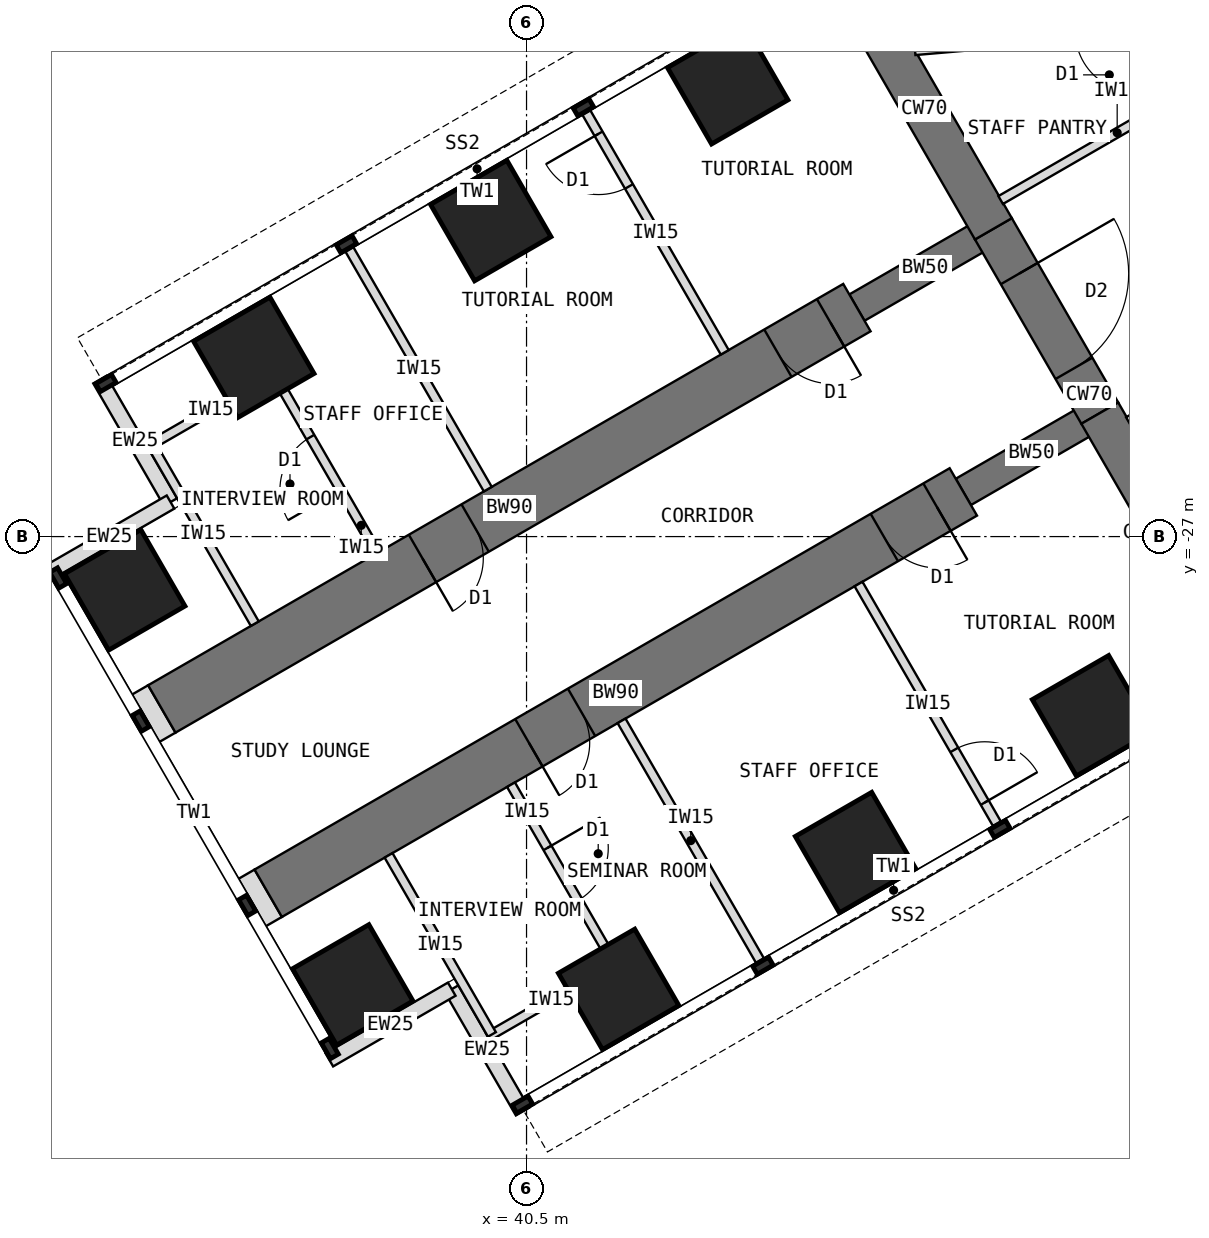
"""IFC4 building model, lengths in metres.
Left out: names, types, materials, properties, quantities, classifications, styles, units other than length and angle.
Written with IfcOpenShell. Run it as: python <this file> out.ifc"""

import sys

from ifc_helpers import new_model, si_unit, direction, frame, frame_2d, origin, origin_2d, place, context, subcontext, project, spatial, rectangle, extrude, element, fill, save


model = new_model("IFC4")
c1 = context("Model", 3, precision=1e-05, world=origin(), true_north=direction((0.0, 1.0)))
c2 = subcontext(c1, "Body", "Model", "MODEL_VIEW")
j1 = project(units=[si_unit("LENGTHUNIT", "METRE"), si_unit("PLANEANGLEUNIT", "RADIAN")], contexts=[c1])
p1 = place(None, origin())
s1 = spatial("IfcSite", under=j1, at=p1, CompositionType="ELEMENT")
p2 = place(p1, origin())
s2 = spatial("IfcBuilding", under=s1, at=p2, CompositionType="ELEMENT")
p3 = place(p2, frame((0.0, 0.0, 60.5)))
s3 = spatial("IfcBuildingStorey", under=s2, at=p3, CompositionType="ELEMENT", Elevation=60.5)
p4 = place(p3, frame((45.904, -18.0, 0.0), z_axis=(0.0, 0.0, 1.0), x_axis=(0.500024481964, -0.866011268655, 0.0)))
e1 = element("IfcWall", 1, at=p4, inside=s3, PredefinedType="SHEAR", context=c2, shape_type="SweptSolid", body=[
    extrude(rectangle(XDim=4.548, YDim=0.7, at=frame_2d((2.274, 0.0))), origin(), (0.0, 0.0, 1.0), 4.0),
])
p5 = place(p3, frame((48.178, -21.939, 0.0), z_axis=(0.0, 0.0, 1.0), x_axis=(0.500010275428, -0.866019471182, 0.0)))
e2 = element("IfcWall", 2, at=p5, inside=s3, PredefinedType="SHEAR", context=c2, shape_type="SweptSolid", body=[
    extrude(rectangle(XDim=3.5, YDim=0.7, at=frame_2d((1.75, 0.0))), origin(), (0.0, 0.0, 1.0), 4.0),
])
p6 = place(p5, frame((0.85, 0.0, 0.0)))
e3 = element("IfcOpeningElement", 3, at=p6, cuts=e2, PredefinedType="OPENING", context=c2, shape_type="SweptSolid", body=[
    extrude(rectangle(XDim=1.8, YDim=2.1, at=frame_2d((0.9, 1.05))), frame((0.0, 0.36, 0.0), z_axis=(0.0, -1.0, 0.0), x_axis=(1.0, 0.0, 0.0)), (0.0, 0.0, 1.0), 0.72),
])
p7 = place(p3, frame((49.928, -24.97, 0.0), z_axis=(0.0, 0.0, 1.0), x_axis=(0.499984222037, -0.866034513004, 0.0)))
e4 = element("IfcWall", 4, at=p7, inside=s3, PredefinedType="SHEAR", context=c2, shape_type="SweptSolid", body=[
    extrude(rectangle(XDim=4.548, YDim=0.7, at=frame_2d((2.274, 0.0))), origin(), (0.0, 0.0, 1.0), 4.0),
])
p8 = place(p3, frame((49.928, -24.97, 0.0), z_axis=(0.0, 0.0, 1.0), x_axis=(-0.866031863473, -0.499988811324, 0.0)))
e5 = element("IfcWall", 5, at=p8, inside=s3, PredefinedType="SHEAR", context=c2, shape_type="SweptSolid", body=[
    extrude(rectangle(XDim=2.592, YDim=0.5, at=frame_2d((1.296, 0.0))), origin(), (0.0, 0.0, 1.0), 4.0),
])
p9 = place(p3, frame((47.684, -26.266, 0.0), z_axis=(0.0, 0.0, 1.0), x_axis=(-0.866027579429, -0.499996231654, 0.0)))
e6 = element("IfcWall", 6, at=p9, inside=s3, PredefinedType="SHEAR", context=c2, shape_type="SweptSolid", body=[
    extrude(rectangle(XDim=13.2, YDim=0.9, at=frame_2d((6.6, 0.0))), origin(), (0.0, 0.0, 1.0), 4.0),
])
p10 = place(p9, frame((0.5, 0.0, 0.0)))
e7 = element("IfcOpeningElement", 7, at=p10, cuts=e6, PredefinedType="OPENING", context=c2, shape_type="SweptSolid", body=[
    extrude(rectangle(XDim=1.0, YDim=2.1, at=frame_2d((0.5, 1.05))), frame((0.0, 0.46, 0.0), z_axis=(0.0, -1.0, 0.0), x_axis=(1.0, 0.0, 0.0)), (0.0, 0.0, 1.0), 0.92),
])
p11 = place(p9, frame((7.25, 0.0, 0.0)))
e8 = element("IfcOpeningElement", 8, at=p11, cuts=e6, PredefinedType="OPENING", context=c2, shape_type="SweptSolid", body=[
    extrude(rectangle(XDim=1.0, YDim=2.1, at=frame_2d((0.5, 1.05))), frame((0.0, 0.46, 0.0), z_axis=(0.0, -1.0, 0.0), x_axis=(1.0, 0.0, 0.0)), (0.0, 0.0, 1.0), 0.92),
])
p12 = place(p3, frame((48.178, -21.939, 0.0), z_axis=(0.0, 0.0, 1.0), x_axis=(-0.866072649678, -0.499918158782, 0.0)))
e9 = element("IfcWall", 9, at=p12, inside=s3, PredefinedType="SHEAR", context=c2, shape_type="SweptSolid", body=[
    extrude(rectangle(XDim=2.592, YDim=0.5, at=frame_2d((1.296, 0.0))), origin(), (0.0, 0.0, 1.0), 4.0),
])
p13 = place(p3, frame((45.934, -23.234, 0.0), z_axis=(0.0, 0.0, 1.0), x_axis=(-0.866019570528, -0.500010103361, 0.0)))
e10 = element("IfcWall", 10, at=p13, inside=s3, PredefinedType="SHEAR", context=c2, shape_type="SweptSolid", body=[
    extrude(rectangle(XDim=13.2, YDim=0.9, at=frame_2d((6.6, 0.0))), origin(), (0.0, 0.0, 1.0), 4.0),
])
p14 = place(p13, frame((0.5, 0.0, 0.0)))
e11 = element("IfcOpeningElement", 11, at=p14, cuts=e10, PredefinedType="OPENING", context=c2, shape_type="SweptSolid", body=[
    extrude(rectangle(XDim=1.0, YDim=2.1, at=frame_2d((0.5, 1.05))), frame((0.0, 0.46, 0.0), z_axis=(0.0, -1.0, 0.0), x_axis=(1.0, 0.0, 0.0)), (0.0, 0.0, 1.0), 0.92),
])
p15 = place(p13, frame((7.25, 0.0, 0.0)))
e12 = element("IfcOpeningElement", 12, at=p15, cuts=e10, PredefinedType="OPENING", context=c2, shape_type="SweptSolid", body=[
    extrude(rectangle(XDim=1.0, YDim=2.1, at=frame_2d((0.5, 1.05))), frame((0.0, 0.46, 0.0), z_axis=(0.0, -1.0, 0.0), x_axis=(1.0, 0.0, 0.0)), (0.0, 0.0, 1.0), 0.92),
])
for number, where, z_axis, x_axis in (
    (13, (49.809, -29.946, 0.0), (0.0, 0.0, 1.0), (0.866, 0.5, 0.0)),
    (14, (43.809, -19.554, 0.0), (0.0, 0.0, 1.0), (0.866, 0.5, 0.0)),
    (15, (45.912, -32.196, 0.0), (0.0, 0.0, 1.0), (0.866, 0.5, 0.0)),
    (16, (39.912, -21.804, 0.0), (0.0, 0.0, 1.0), (0.866, 0.5, 0.0)),
    (17, (42.014, -34.446, 0.0), (0.0, 0.0, 1.0), (0.866, 0.5, 0.0)),
    (18, (36.014, -24.054, 0.0), (0.0, 0.0, 1.0), (0.866, 0.5, 0.0)),
    (19, (37.642, -34.373, 0.0), (0.0, 0.0, 1.0), (0.866, 0.5, 0.0)),
    (20, (33.892, -27.877, 0.0), (0.0, 0.0, 1.0), (0.866, 0.5, 0.0)),
):
    element("IfcColumn", number, at=place(p3, frame(where, z_axis=z_axis, x_axis=x_axis)), inside=s3, PredefinedType="COLUMN", context=c2, shape_type="SweptSolid", body=[
        extrude(rectangle(XDim=1.45, YDim=1.45, at=origin_2d()), origin(), (0.0, 0.0, 1.0), 4.0),
    ])
for number, where, z_axis, x_axis in (
    (21, (40.433, -36.456, 0.0), (0.0, 0.0, 1.0), (-0.5, 0.866, 0.0)),
    (22, (39.27, -34.443, 0.0), (0.0, 0.0, 1.0), (-0.866, -0.5, 0.0)),
    (23, (33.483, -24.419, 0.0), (0.0, 0.0, 1.0), (0.5, -0.866, 0.0)),
    (24, (34.645, -26.432, 0.0), (0.0, 0.0, 1.0), (-0.866, -0.5, 0.0)),
):
    element("IfcWall", number, at=place(p3, frame(where, z_axis=z_axis, x_axis=x_axis)), inside=s3, PredefinedType="STANDARD", context=c2, shape_type="SweptSolid", body=[
        extrude(rectangle(XDim=2.325, YDim=0.25, at=frame_2d((1.163, 0.0))), origin(), (0.0, 0.0, 1.0), 3.8),
    ])
for number, where, z_axis, x_axis in (
    (25, (36.252, -32.865, 0.0), (0.0, 0.0, 1.0), (-0.866, -0.5, 0.0)),
    (26, (34.502, -29.834, 0.0), (0.0, 0.0, 1.0), (-0.866, -0.5, 0.0)),
):
    element("IfcWall", number, at=place(p3, frame(where, z_axis=z_axis, x_axis=x_axis)), inside=s3, PredefinedType="PARTITIONING", context=c2, shape_type="SweptSolid", body=[
        extrude(rectangle(XDim=0.31, YDim=0.9, at=frame_2d((0.155, 0.0))), origin(), (0.0, 0.0, 1.0), 3.8),
    ])
p16 = place(p3, frame((52.38, -19.201, 0.0), z_axis=(0.0, 0.0, 1.0), x_axis=(-0.866023886965, 0.500002627198, 0.0)))
e27 = element("IfcWall", 27, at=p16, inside=s3, PredefinedType="SHEAR", context=c2, shape_type="SweptSolid", body=[
    extrude(rectangle(XDim=5.858, YDim=0.4, at=frame_2d((2.929, 0.0))), origin(), (0.0, 0.0, 1.0), 4.0),
])
p17 = place(p3, frame((45.96, -27.78, 0.0), z_axis=(0.0, 0.0, 1.0), x_axis=(0.499982560684, -0.866035472144, 0.0)))
e28 = element("IfcWall", 28, at=p17, inside=s3, PredefinedType="PARTITIONING", context=c2, shape_type="SweptSolid", body=[
    extrude(rectangle(XDim=4.55, YDim=0.15, at=frame_2d((2.275, 0.0))), origin(), (0.0, 0.0, 1.0), 3.8),
])
p18 = place(p17, frame((3.15, 0.0, 0.0)))
e29 = element("IfcOpeningElement", 29, at=p18, cuts=e28, PredefinedType="OPENING", context=c2, shape_type="SweptSolid", body=[
    extrude(rectangle(XDim=1.0, YDim=2.1, at=frame_2d((0.5, 1.05))), frame((0.0, 0.085, 0.0), z_axis=(0.0, -1.0, 0.0), x_axis=(1.0, 0.0, 0.0)), (0.0, 0.0, 1.0), 0.17),
])
p19 = place(p3, frame((42.063, -30.03, 0.0), z_axis=(0.0, 0.0, 1.0), x_axis=(0.499982560684, -0.866035472144, 0.0)))
e30 = element("IfcWall", 30, at=p19, inside=s3, PredefinedType="PARTITIONING", context=c2, shape_type="SweptSolid", body=[
    extrude(rectangle(XDim=4.55, YDim=0.15, at=frame_2d((2.275, 0.0))), origin(), (0.0, 0.0, 1.0), 3.8),
])
p20 = place(p3, frame((41.944, -34.025, 0.0), z_axis=(0.0, 0.0, 1.0), x_axis=(-0.865980596518, -0.500077600433, 0.0)))
e31 = element("IfcWall", 31, at=p20, inside=s3, PredefinedType="PARTITIONING", context=c2, shape_type="SweptSolid", body=[
    extrude(rectangle(XDim=2.4, YDim=0.15, at=frame_2d((1.2, 0.0))), origin(), (0.0, 0.0, 1.0), 3.8),
])
p21 = place(p3, frame((40.244, -31.08, 0.0), z_axis=(0.0, 0.0, 1.0), x_axis=(0.500008388397, -0.866020560687, 0.0)))
e32 = element("IfcWall", 32, at=p21, inside=s3, PredefinedType="PARTITIONING", context=c2, shape_type="SweptSolid", body=[
    extrude(rectangle(XDim=3.4, YDim=0.15, at=frame_2d((1.7, 0.0))), origin(), (0.0, 0.0, 1.0), 3.8),
])
p22 = place(p21, frame((1.2, 0.0, 0.0)))
e33 = element("IfcOpeningElement", 33, at=p22, cuts=e32, PredefinedType="OPENING", context=c2, shape_type="SweptSolid", body=[
    extrude(rectangle(XDim=1.0, YDim=2.1, at=frame_2d((0.5, 1.05))), frame((0.0, 0.085, 0.0), z_axis=(0.0, -1.0, 0.0), x_axis=(1.0, 0.0, 0.0)), (0.0, 0.0, 1.0), 0.17),
])
p23 = place(p3, frame((38.231, -32.243, 0.0), z_axis=(0.0, 0.0, 1.0), x_axis=(0.500031147688, -0.866007419912, 0.0)))
e34 = element("IfcWall", 34, at=p23, inside=s3, PredefinedType="PARTITIONING", context=c2, shape_type="SweptSolid", body=[
    extrude(rectangle(XDim=3.4, YDim=0.15, at=frame_2d((1.7, 0.0))), origin(), (0.0, 0.0, 1.0), 3.8),
])
p24 = place(p3, frame((43.76, -23.97, 0.0), z_axis=(0.0, 0.0, 1.0), x_axis=(-0.499982560684, 0.866035472144, 0.0)))
e35 = element("IfcWall", 35, at=p24, inside=s3, PredefinedType="PARTITIONING", context=c2, shape_type="SweptSolid", body=[
    extrude(rectangle(XDim=4.55, YDim=0.15, at=frame_2d((2.275, 0.0))), origin(), (0.0, 0.0, 1.0), 3.8),
])
p25 = place(p24, frame((3.15, 0.0, 0.0)))
e36 = element("IfcOpeningElement", 36, at=p25, cuts=e35, PredefinedType="OPENING", context=c2, shape_type="SweptSolid", body=[
    extrude(rectangle(XDim=1.0, YDim=2.1, at=frame_2d((0.5, 1.05))), frame((0.0, 0.085, 0.0), z_axis=(0.0, -1.0, 0.0), x_axis=(1.0, 0.0, 0.0)), (0.0, 0.0, 1.0), 0.17),
])
p26 = place(p3, frame((39.863, -26.22, 0.0), z_axis=(0.0, 0.0, 1.0), x_axis=(-0.500022803284, 0.866012237902, 0.0)))
e37 = element("IfcWall", 37, at=p26, inside=s3, PredefinedType="PARTITIONING", context=c2, shape_type="SweptSolid", body=[
    extrude(rectangle(XDim=4.55, YDim=0.15, at=frame_2d((2.275, 0.0))), origin(), (0.0, 0.0, 1.0), 3.8),
])
p27 = place(p3, frame((36.344, -24.325, 0.0), z_axis=(0.0, 0.0, 1.0), x_axis=(-0.866024647952, -0.500001309137, 0.0)))
e38 = element("IfcWall", 38, at=p27, inside=s3, PredefinedType="PARTITIONING", context=c2, shape_type="SweptSolid", body=[
    extrude(rectangle(XDim=2.4, YDim=0.15, at=frame_2d((1.2, 0.0))), origin(), (0.0, 0.0, 1.0), 3.8),
])
p28 = place(p3, frame((38.044, -27.27, 0.0), z_axis=(0.0, 0.0, 1.0), x_axis=(-0.500031147688, 0.866007419912, 0.0)))
e39 = element("IfcWall", 39, at=p28, inside=s3, PredefinedType="PARTITIONING", context=c2, shape_type="SweptSolid", body=[
    extrude(rectangle(XDim=3.4, YDim=0.15, at=frame_2d((1.7, 0.0))), origin(), (0.0, 0.0, 1.0), 3.8),
])
p29 = place(p28, frame((1.2, 0.0, 0.0)))
e40 = element("IfcOpeningElement", 40, at=p29, cuts=e39, PredefinedType="OPENING", context=c2, shape_type="SweptSolid", body=[
    extrude(rectangle(XDim=1.0, YDim=2.1, at=frame_2d((0.5, 1.05))), frame((0.0, 0.085, 0.0), z_axis=(0.0, -1.0, 0.0), x_axis=(1.0, 0.0, 0.0)), (0.0, 0.0, 1.0), 0.17),
])
p30 = place(p3, frame((36.031, -28.432, 0.0), z_axis=(0.0, 0.0, 1.0), x_axis=(-0.500008388397, 0.866020560687, 0.0)))
e41 = element("IfcWall", 41, at=p30, inside=s3, PredefinedType="PARTITIONING", context=c2, shape_type="SweptSolid", body=[
    extrude(rectangle(XDim=3.4, YDim=0.15, at=frame_2d((1.7, 0.0))), origin(), (0.0, 0.0, 1.0), 3.8),
])
p31 = place(p3, frame((48.298, -21.466, 0.0), z_axis=(0.0, 0.0, 1.0), x_axis=(0.866021148949, 0.500007369519, 0.0)))
e42 = element("IfcWall", 42, at=p31, inside=s3, PredefinedType="PARTITIONING", context=c2, shape_type="SweptSolid", body=[
    extrude(rectangle(XDim=4.426, YDim=0.15, at=frame_2d((2.213, 0.0))), origin(), (0.0, 0.0, 1.0), 3.8),
])
p32 = place(p31, frame((2.598, 0.0, 0.0)))
e43 = element("IfcOpeningElement", 43, at=p32, cuts=e42, PredefinedType="OPENING", context=c2, shape_type="SweptSolid", body=[
    extrude(rectangle(XDim=1.0, YDim=2.1, at=frame_2d((0.5, 1.05))), frame((0.0, 0.085, 0.0), z_axis=(0.0, -1.0, 0.0), x_axis=(1.0, 0.0, 0.0)), (0.0, 0.0, 1.0), 0.17),
])
p33 = place(p3, frame((54.23, -22.89, 0.0), z_axis=(0.0, 0.0, 1.0), x_axis=(-0.866021148949, -0.500007369519, 0.0)))
e44 = element("IfcWall", 44, at=p33, inside=s3, PredefinedType="PARTITIONING", context=c2, shape_type="SweptSolid", body=[
    extrude(rectangle(XDim=4.426, YDim=0.15, at=frame_2d((2.213, 0.0))), origin(), (0.0, 0.0, 1.0), 3.8),
])
p34 = place(p33, frame((0.828, 0.0, 0.0)))
e45 = element("IfcOpeningElement", 45, at=p34, cuts=e44, PredefinedType="OPENING", context=c2, shape_type="SweptSolid", body=[
    extrude(rectangle(XDim=1.0, YDim=2.1, at=frame_2d((0.5, 1.05))), frame((0.0, 0.085, 0.0), z_axis=(0.0, -1.0, 0.0), x_axis=(1.0, 0.0, 0.0)), (0.0, 0.0, 1.0), 0.17),
])
p35 = place(p3, frame((51.371, -18.618, 0.0), z_axis=(0.0, 0.0, 1.0), x_axis=(-0.996259708579, -0.086409450071, 0.0)))
e46 = element("IfcWall", 46, at=p35, inside=s3, PredefinedType="PARTITIONING", context=c2, shape_type="SweptSolid", body=[
    extrude(rectangle(XDim=4.498, YDim=0.15, at=frame_2d((2.249, 0.0))), origin(), (0.0, 0.0, 1.0), 3.8),
])
p36 = place(p35, frame((0.849, 0.0, 0.0)))
e47 = element("IfcOpeningElement", 47, at=p36, cuts=e46, PredefinedType="OPENING", context=c2, shape_type="SweptSolid", body=[
    extrude(rectangle(XDim=1.0, YDim=2.1, at=frame_2d((0.5, 1.05))), frame((0.0, 0.085, 0.0), z_axis=(0.0, -1.0, 0.0), x_axis=(1.0, 0.0, 0.0)), (0.0, 0.0, 1.0), 0.17),
])
p37 = place(p6, origin())
e48 = element("IfcDoor", 48, at=p37, inside=s3, OperationType="DOUBLE_DOOR_DOUBLE_SWING", PredefinedType="DOOR", context=c2, shape_type="SweptSolid", body=[
    extrude(rectangle(XDim=1.72, YDim=2.06, at=frame_2d((0.9, 1.03))), frame((0.0, 0.025, 0.0), z_axis=(0.0, -1.0, 0.0), x_axis=(1.0, 0.0, 0.0)), (0.0, 0.0, 1.0), 0.05),
    extrude(rectangle(XDim=0.04, YDim=2.1, at=frame_2d((0.02, 1.05))), frame((0.0, 0.35, 0.0), z_axis=(0.0, -1.0, 0.0), x_axis=(1.0, 0.0, 0.0)), (0.0, 0.0, 1.0), 0.699),
    extrude(rectangle(XDim=0.04, YDim=2.1, at=frame_2d((1.78, 1.05))), frame((0.0, 0.35, 0.0), z_axis=(0.0, -1.0, 0.0), x_axis=(1.0, 0.0, 0.0)), (0.0, 0.0, 1.0), 0.699),
    extrude(rectangle(XDim=1.72, YDim=0.04, at=frame_2d((0.9, 2.08))), frame((0.0, 0.35, 0.0), z_axis=(0.0, -1.0, 0.0), x_axis=(1.0, 0.0, 0.0)), (0.0, 0.0, 1.0), 0.699),
])
fill(e3, e48)
p38 = place(p18, origin())
e49 = element("IfcDoor", 49, at=p38, inside=s3, OperationType="SINGLE_SWING_RIGHT", PredefinedType="DOOR", context=c2, shape_type="SweptSolid", body=[
    extrude(rectangle(XDim=1.0, YDim=2.1, at=frame_2d((0.5, 1.05))), frame((0.0, 0.025, 0.0), z_axis=(0.0, -1.0, 0.0), x_axis=(1.0, 0.0, 0.0)), (0.0, 0.0, 1.0), 0.05),
])
fill(e29, e49)
p39 = place(p22, origin())
e50 = element("IfcDoor", 50, at=p39, inside=s3, OperationType="SINGLE_SWING_LEFT", PredefinedType="DOOR", context=c2, shape_type="SweptSolid", body=[
    extrude(rectangle(XDim=1.0, YDim=2.1, at=frame_2d((0.5, 1.05))), frame((0.0, 0.025, 0.0), z_axis=(0.0, -1.0, 0.0), x_axis=(1.0, 0.0, 0.0)), (0.0, 0.0, 1.0), 0.05),
])
fill(e33, e50)
p40 = place(p25, origin())
e51 = element("IfcDoor", 51, at=p40, inside=s3, OperationType="SINGLE_SWING_RIGHT", PredefinedType="DOOR", context=c2, shape_type="SweptSolid", body=[
    extrude(rectangle(XDim=1.0, YDim=2.1, at=frame_2d((0.5, 1.05))), frame((0.0, 0.025, 0.0), z_axis=(0.0, -1.0, 0.0), x_axis=(1.0, 0.0, 0.0)), (0.0, 0.0, 1.0), 0.05),
])
fill(e36, e51)
p41 = place(p29, origin())
e52 = element("IfcDoor", 52, at=p41, inside=s3, OperationType="SINGLE_SWING_LEFT", PredefinedType="DOOR", context=c2, shape_type="SweptSolid", body=[
    extrude(rectangle(XDim=1.0, YDim=2.1, at=frame_2d((0.5, 1.05))), frame((0.0, 0.025, 0.0), z_axis=(0.0, -1.0, 0.0), x_axis=(1.0, 0.0, 0.0)), (0.0, 0.0, 1.0), 0.05),
])
fill(e40, e52)
p42 = place(p10, origin())
e53 = element("IfcDoor", 53, at=p42, inside=s3, OperationType="SINGLE_SWING_LEFT", PredefinedType="DOOR", context=c2, shape_type="SweptSolid", body=[
    extrude(rectangle(XDim=0.92, YDim=2.06, at=frame_2d((0.5, 1.03))), frame((0.0, 0.025, 0.0), z_axis=(0.0, -1.0, 0.0), x_axis=(1.0, 0.0, 0.0)), (0.0, 0.0, 1.0), 0.05),
    extrude(rectangle(XDim=0.04, YDim=2.1, at=frame_2d((0.02, 1.05))), frame((0.0, 0.45, 0.0), z_axis=(0.0, -1.0, 0.0), x_axis=(1.0, 0.0, 0.0)), (0.0, 0.0, 1.0), 0.899),
    extrude(rectangle(XDim=0.04, YDim=2.1, at=frame_2d((0.98, 1.05))), frame((0.0, 0.45, 0.0), z_axis=(0.0, -1.0, 0.0), x_axis=(1.0, 0.0, 0.0)), (0.0, 0.0, 1.0), 0.899),
    extrude(rectangle(XDim=0.92, YDim=0.04, at=frame_2d((0.5, 2.08))), frame((0.0, 0.45, 0.0), z_axis=(0.0, -1.0, 0.0), x_axis=(1.0, 0.0, 0.0)), (0.0, 0.0, 1.0), 0.899),
])
fill(e7, e53)
p43 = place(p11, origin())
e54 = element("IfcDoor", 54, at=p43, inside=s3, OperationType="SINGLE_SWING_RIGHT", PredefinedType="DOOR", context=c2, shape_type="SweptSolid", body=[
    extrude(rectangle(XDim=0.92, YDim=2.06, at=frame_2d((0.5, 1.03))), frame((0.0, 0.025, 0.0), z_axis=(0.0, -1.0, 0.0), x_axis=(1.0, 0.0, 0.0)), (0.0, 0.0, 1.0), 0.05),
    extrude(rectangle(XDim=0.04, YDim=2.1, at=frame_2d((0.02, 1.05))), frame((0.0, 0.45, 0.0), z_axis=(0.0, -1.0, 0.0), x_axis=(1.0, 0.0, 0.0)), (0.0, 0.0, 1.0), 0.899),
    extrude(rectangle(XDim=0.04, YDim=2.1, at=frame_2d((0.98, 1.05))), frame((0.0, 0.45, 0.0), z_axis=(0.0, -1.0, 0.0), x_axis=(1.0, 0.0, 0.0)), (0.0, 0.0, 1.0), 0.899),
    extrude(rectangle(XDim=0.92, YDim=0.04, at=frame_2d((0.5, 2.08))), frame((0.0, 0.45, 0.0), z_axis=(0.0, -1.0, 0.0), x_axis=(1.0, 0.0, 0.0)), (0.0, 0.0, 1.0), 0.899),
])
fill(e8, e54)
p44 = place(p14, origin())
e55 = element("IfcDoor", 55, at=p44, inside=s3, OperationType="SINGLE_SWING_LEFT", PredefinedType="DOOR", context=c2, shape_type="SweptSolid", body=[
    extrude(rectangle(XDim=0.92, YDim=2.06, at=frame_2d((0.5, 1.03))), frame((0.0, 0.025, 0.0), z_axis=(0.0, -1.0, 0.0), x_axis=(1.0, 0.0, 0.0)), (0.0, 0.0, 1.0), 0.05),
    extrude(rectangle(XDim=0.04, YDim=2.1, at=frame_2d((0.02, 1.05))), frame((0.0, 0.45, 0.0), z_axis=(0.0, -1.0, 0.0), x_axis=(1.0, 0.0, 0.0)), (0.0, 0.0, 1.0), 0.899),
    extrude(rectangle(XDim=0.04, YDim=2.1, at=frame_2d((0.98, 1.05))), frame((0.0, 0.45, 0.0), z_axis=(0.0, -1.0, 0.0), x_axis=(1.0, 0.0, 0.0)), (0.0, 0.0, 1.0), 0.899),
    extrude(rectangle(XDim=0.92, YDim=0.04, at=frame_2d((0.5, 2.08))), frame((0.0, 0.45, 0.0), z_axis=(0.0, -1.0, 0.0), x_axis=(1.0, 0.0, 0.0)), (0.0, 0.0, 1.0), 0.899),
])
fill(e11, e55)
p45 = place(p15, origin())
e56 = element("IfcDoor", 56, at=p45, inside=s3, OperationType="SINGLE_SWING_RIGHT", PredefinedType="DOOR", context=c2, shape_type="SweptSolid", body=[
    extrude(rectangle(XDim=0.92, YDim=2.06, at=frame_2d((0.5, 1.03))), frame((0.0, 0.025, 0.0), z_axis=(0.0, -1.0, 0.0), x_axis=(1.0, 0.0, 0.0)), (0.0, 0.0, 1.0), 0.05),
    extrude(rectangle(XDim=0.04, YDim=2.1, at=frame_2d((0.02, 1.05))), frame((0.0, 0.45, 0.0), z_axis=(0.0, -1.0, 0.0), x_axis=(1.0, 0.0, 0.0)), (0.0, 0.0, 1.0), 0.899),
    extrude(rectangle(XDim=0.04, YDim=2.1, at=frame_2d((0.98, 1.05))), frame((0.0, 0.45, 0.0), z_axis=(0.0, -1.0, 0.0), x_axis=(1.0, 0.0, 0.0)), (0.0, 0.0, 1.0), 0.899),
    extrude(rectangle(XDim=0.92, YDim=0.04, at=frame_2d((0.5, 2.08))), frame((0.0, 0.45, 0.0), z_axis=(0.0, -1.0, 0.0), x_axis=(1.0, 0.0, 0.0)), (0.0, 0.0, 1.0), 0.899),
])
fill(e12, e56)
save(model, sys.argv[1])
